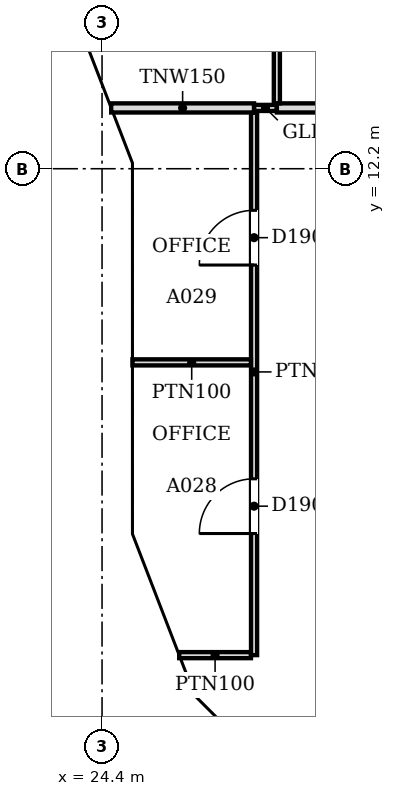
"""IFC4 building model, lengths in metres.
Left out: names, types, materials, properties, quantities, classifications, styles, units other than length and angle.
Written with IfcOpenShell. Run it as: python <this file> out.ifc"""

import sys

from ifc_helpers import new_model, si_unit, direction, frame, frame_2d, origin, place, context, subcontext, project, spatial, polyline, rectangle, outline, extrude, faceted_brep, source, transform, mapped, element, fill, save


model = new_model("IFC4")
c1 = context("Model", 3, precision=1e-05, world=origin(), true_north=direction((0.0, 1.0)))
c2 = subcontext(c1, "Body", "Model", "MODEL_VIEW")
j1 = project(units=[si_unit("LENGTHUNIT", "METRE"), si_unit("PLANEANGLEUNIT", "RADIAN")], contexts=[c1])
p1 = place(None, origin())
s1 = spatial("IfcSite", under=j1, at=p1, CompositionType="ELEMENT")
p2 = place(p1, origin())
s2 = spatial("IfcBuilding", under=s1, at=p2, CompositionType="ELEMENT")
p3 = place(p2, frame((0.0, 0.0, 116.4)))
s3 = spatial("IfcBuildingStorey", under=s2, at=p3, CompositionType="ELEMENT", Elevation=116.4)
m1 = source(origin(), c2, "Body", "Brep", [
    faceted_brep([(3.103, -0.25, 7.544), (0.053, -0.25, 3.864), (0.053, -0.25, 3.736), (3.103, -0.25, 0.056), (0.0, 0.25, 3.8), (3.149, 0.25, 7.6), (3.196, 0.25, 7.543), (3.196, 0.25, 0.057), (3.149, 0.25, 0.0), (3.149, -0.0, 0.0), (3.149, -0.0, 7.6), (0.0, 0.0, 3.8)], [[[0, 1, 2, 3]], [[4, 5, 6, 7, 8]], [[8, 7, 9]], [[6, 5, 10]], [[5, 4, 11, 1, 0, 10]], [[4, 8, 9, 3, 2, 11]], [[11, 2, 1]], [[3, 9, 7, 6, 10, 0]]]),
])
p4 = place(p3, frame((23.517, 15.185, -3.8), z_axis=(0.0, 0.0, 1.0), x_axis=(0.359864468756, -0.933004589553, 0.0)))
e1 = element("IfcWall", 1, at=p4, inside=s3, PredefinedType="SOLIDWALL", context=c2, shape_type="MappedRepresentation", body=[
    mapped(m1, transform((0.0, 0.0, 0.0), scale=1.0)),
])
m2 = source(origin(), c2, "Body", "SweptSolid", [
    extrude(outline(polyline([(2.949, 6.967), (0.325, 3.8), (2.949, 0.633), (2.949, 6.967)])), frame((0.0, 0.26, 0.0), z_axis=(0.0, -1.0, 0.0), x_axis=(1.0, 0.0, 0.0)), (0.0, 0.0, 1.0), 0.52),
])
p5 = place(p4, origin())
e2 = element("IfcOpeningElement", 2, at=p5, cuts=e1, PredefinedType="OPENING", context=c2, shape_type="MappedRepresentation", body=[
    mapped(m2, transform((0.0, 0.0, 0.0), scale=1.0)),
])
m3 = source(origin(), c2, "Body", "Brep", [
    faceted_brep([(0.093, -0.25, 0.057), (3.143, -0.25, 3.8), (0.093, -0.25, 7.543), (0.0, 0.25, 7.544), (0.047, 0.25, 7.6), (3.143, 0.25, 3.8), (0.047, 0.25, 0.0), (0.0, 0.25, 0.056), (0.047, 0.0, 0.0), (0.047, 0.0, 7.6)], [[[0, 1, 2]], [[3, 4, 5, 6, 7]], [[6, 5, 1, 0, 8]], [[5, 4, 9, 2, 1]], [[4, 3, 9]], [[7, 6, 8]], [[7, 8, 0, 2, 9, 3]]]),
])
p6 = place(p3, frame((24.65, 12.293, -3.8), z_axis=(0.0, 0.0, 1.0), x_axis=(0.0, -1.0, 0.0)))
e3 = element("IfcWall", 3, at=p6, inside=s3, PredefinedType="SOLIDWALL", context=c2, shape_type="MappedRepresentation", body=[
    mapped(m3, transform((0.0, 0.0, 0.0), scale=1.0)),
])
m4 = source(origin(), c2, "Body", "SweptSolid", [
    extrude(outline(polyline([(0.247, 0.641), (2.821, 3.8), (0.247, 6.959), (0.247, 0.641)])), frame((0.0, 0.26, 0.0), z_axis=(0.0, -1.0, 0.0), x_axis=(1.0, 0.0, 0.0)), (0.0, 0.0, 1.0), 0.52),
])
p7 = place(p6, origin())
e4 = element("IfcOpeningElement", 4, at=p7, cuts=e3, PredefinedType="OPENING", context=c2, shape_type="MappedRepresentation", body=[
    mapped(m4, transform((0.0, 0.0, 0.0), scale=1.0)),
])
m5 = source(origin(), c2, "Body", "Brep", [
    faceted_brep([(3.003, -0.25, 0.0), (3.05, -0.25, 0.06), (3.05, -0.25, 7.54), (3.003, -0.25, 7.6), (0.0, -0.25, 3.8), (0.0, 0.25, 3.8), (2.957, 0.25, 7.541), (2.957, 0.25, 0.059), (3.003, 0.0, 0.0), (3.003, 0.0, 7.6)], [[[0, 1, 2, 3, 4]], [[5, 6, 7]], [[1, 0, 8]], [[9, 3, 2]], [[6, 5, 4, 3, 9]], [[5, 7, 8, 0, 4]], [[1, 8, 7, 6, 9, 2]]]),
])
p8 = place(p3, frame((24.65, 9.15, -3.8), z_axis=(0.0, 0.0, 1.0), x_axis=(0.0, -1.0, 0.0)))
e5 = element("IfcWall", 5, at=p8, inside=s3, PredefinedType="SOLIDWALL", context=c2, shape_type="MappedRepresentation", body=[
    mapped(m5, transform((0.0, 0.0, 0.0), scale=1.0)),
])
m6 = source(origin(), c2, "Body", "SweptSolid", [
    extrude(outline(polyline([(2.803, 6.944), (0.319, 3.8), (2.803, 0.656), (2.803, 6.944)])), frame((0.0, 0.26, 0.0), z_axis=(0.0, -1.0, 0.0), x_axis=(1.0, 0.0, 0.0)), (0.0, 0.0, 1.0), 0.52),
])
p9 = place(p8, origin())
e6 = element("IfcOpeningElement", 6, at=p9, cuts=e5, PredefinedType="OPENING", context=c2, shape_type="MappedRepresentation", body=[
    mapped(m6, transform((0.0, 0.0, 0.0), scale=1.0)),
])
m7 = source(origin(), c2, "Body", "Brep", [
    faceted_brep([(0.047, -0.25, 0.0), (2.997, -0.25, 3.8), (0.047, -0.25, 7.6), (0.0, -0.25, 7.541), (0.0, -0.25, 0.059), (0.093, 0.25, 7.54), (2.944, 0.25, 3.868), (2.944, 0.25, 3.732), (0.093, 0.25, 0.06), (2.997, 0.0, 3.8), (0.047, 0.0, 0.0), (0.047, 0.0, 7.6)], [[[0, 1, 2, 3, 4]], [[5, 6, 7, 8]], [[8, 7, 9, 1, 0, 10]], [[6, 5, 11, 2, 1, 9]], [[3, 2, 11]], [[10, 0, 4]], [[8, 10, 4, 3, 11, 5]], [[9, 7, 6]]]),
])
p10 = place(p3, frame((24.633, 6.19, -3.8), z_axis=(0.0, 0.0, 1.0), x_axis=(0.359901446078, -0.932990326376, 0.0)))
e7 = element("IfcWall", 7, at=p10, inside=s3, PredefinedType="SOLIDWALL", context=c2, shape_type="MappedRepresentation", body=[
    mapped(m7, transform((0.0, 0.0, 0.0), scale=1.0)),
])
m8 = source(origin(), c2, "Body", "SweptSolid", [
    extrude(outline(polyline([(0.247, 0.665), (2.681, 3.8), (0.247, 6.935), (0.247, 0.665)])), frame((0.0, 0.26, 0.0), z_axis=(0.0, -1.0, 0.0), x_axis=(1.0, 0.0, 0.0)), (0.0, 0.0, 1.0), 0.52),
])
p11 = place(p10, origin())
e8 = element("IfcOpeningElement", 8, at=p11, cuts=e7, PredefinedType="OPENING", context=c2, shape_type="MappedRepresentation", body=[
    mapped(m8, transform((0.0, 0.0, 0.0), scale=1.0)),
])
m9 = source(origin(), c2, "Body", "Brep", [
    faceted_brep([(2.944, -0.25, 0.0), (2.997, -0.25, 0.068), (2.997, -0.25, 7.532), (2.944, -0.25, 7.6), (0.0, -0.25, 3.8), (0.053, 0.25, 3.868), (2.891, 0.25, 7.532), (2.891, 0.25, 0.068), (0.053, 0.25, 3.731), (2.944, 0.0, 0.0), (2.944, 0.0, 7.6), (0.0, 0.0, 3.8)], [[[0, 1, 2, 3, 4]], [[5, 6, 7, 8]], [[1, 0, 9]], [[10, 3, 2]], [[6, 5, 11, 4, 3, 10]], [[8, 7, 9, 0, 4, 11]], [[8, 11, 5]], [[1, 9, 7, 6, 10, 2]]]),
])
p12 = place(p3, frame((25.712, 3.394, -3.8), z_axis=(0.0, 0.0, 1.0), x_axis=(0.707066050402, -0.707147509625, 0.0)))
e9 = element("IfcWall", 9, at=p12, inside=s3, PredefinedType="SOLIDWALL", context=c2, shape_type="MappedRepresentation", body=[
    mapped(m9, transform((0.0, 0.0, 0.0), scale=1.0)),
])
m10 = source(origin(), c2, "Body", "SweptSolid", [
    extrude(outline(polyline([(2.744, 6.934), (0.316, 3.8), (2.744, 0.666), (2.744, 6.934)])), frame((0.0, 0.26, 0.0), z_axis=(0.0, -1.0, 0.0), x_axis=(1.0, 0.0, 0.0)), (0.0, 0.0, 1.0), 0.52),
])
p13 = place(p12, origin())
e10 = element("IfcOpeningElement", 10, at=p13, cuts=e9, PredefinedType="OPENING", context=c2, shape_type="MappedRepresentation", body=[
    mapped(m10, transform((0.0, 0.0, 0.0), scale=1.0)),
])
p14 = place(p2, frame((0.0, 0.0, 120.2)))
s4 = spatial("IfcBuildingStorey", under=s2, at=p14, CompositionType="ELEMENT", Elevation=120.2)
m11 = source(origin(), c2, "Body", "Brep", [
    faceted_brep([(0.106, -0.25, 0.064), (3.156, -0.25, 3.744), (3.156, -0.25, 3.856), (0.106, -0.25, 7.536), (0.0, 0.25, 7.536), (0.053, 0.25, 7.6), (3.202, 0.25, 3.8), (0.053, 0.25, 0.0), (0.0, 0.25, 0.064), (3.202, -0.0, 3.8), (0.053, 0.0, 0.0), (0.053, 0.0, 7.6)], [[[0, 1, 2, 3]], [[4, 5, 6, 7, 8]], [[7, 6, 9, 1, 0, 10]], [[6, 5, 11, 3, 2, 9]], [[5, 4, 11]], [[8, 7, 10]], [[8, 10, 0, 3, 11, 4]], [[1, 9, 2]]]),
])
p15 = place(p14, frame((23.497, 15.234, -3.8), z_axis=(0.0, 0.0, 1.0), x_axis=(0.359913782069, -0.932985567668, 0.0)))
e11 = element("IfcWall", 11, at=p15, inside=s4, PredefinedType="SOLIDWALL", context=c2, shape_type="MappedRepresentation", body=[
    mapped(m11, transform((0.0, 0.0, 0.0), scale=1.0)),
])
m12 = source(origin(), c2, "Body", "SweptSolid", [
    extrude(outline(polyline([(0.253, 0.633), (2.878, 3.8), (0.253, 6.967), (0.253, 0.633)])), frame((0.0, 0.26, 0.0), z_axis=(0.0, -1.0, 0.0), x_axis=(1.0, 0.0, 0.0)), (0.0, 0.0, 1.0), 0.52),
])
p16 = place(p15, origin())
e12 = element("IfcOpeningElement", 12, at=p16, cuts=e11, PredefinedType="OPENING", context=c2, shape_type="MappedRepresentation", body=[
    mapped(m12, transform((0.0, 0.0, 0.0), scale=1.0)),
])
m13 = source(origin(), c2, "Body", "Brep", [
    faceted_brep([(3.096, -0.25, 0.0), (6.1, -0.25, 3.8), (3.096, -0.25, 7.6), (0.047, -0.25, 3.857), (0.047, -0.25, 3.743), (0.0, 0.25, 3.8), (3.096, 0.25, 7.6), (6.053, 0.25, 3.859), (6.053, 0.25, 3.741), (3.096, 0.25, 0.0), (6.1, -0.0, 3.8), (0.0, 0.0, 3.8)], [[[0, 1, 2, 3, 4]], [[5, 6, 7, 8, 9]], [[9, 8, 10, 1, 0]], [[7, 6, 2, 1, 10]], [[6, 5, 11, 3, 2]], [[5, 9, 0, 4, 11]], [[11, 4, 3]], [[10, 8, 7]]]),
])
p17 = place(p14, frame((24.65, 12.247, -3.8), z_axis=(0.0, 0.0, 1.0), x_axis=(0.0, -1.0, 0.0)))
e13 = element("IfcWall", 13, at=p17, inside=s4, PredefinedType="SOLIDWALL", context=c2, shape_type="MappedRepresentation", body=[
    mapped(m13, transform((0.0, 0.0, 0.0), scale=1.0)),
])
m14 = source(origin(), c2, "Body", "SweptSolid", [
    extrude(outline(polyline([(3.094, 0.399), (5.781, 3.8), (3.094, 7.201), (0.323, 3.8), (3.094, 0.399)])), frame((0.0, 0.26, 0.0), z_axis=(0.0, -1.0, 0.0), x_axis=(1.0, 0.0, 0.0)), (0.0, 0.0, 1.0), 0.52),
])
p18 = place(p17, origin())
e14 = element("IfcOpeningElement", 14, at=p18, cuts=e13, PredefinedType="OPENING", context=c2, shape_type="MappedRepresentation", body=[
    mapped(m14, transform((0.0, 0.0, 0.0), scale=1.0)),
])
m15 = source(origin(), c2, "Body", "Brep", [
    faceted_brep([(2.95, -0.25, 0.0), (3.003, -0.25, 0.068), (3.003, -0.25, 7.532), (2.95, -0.25, 7.6), (0.0, -0.25, 3.8), (0.047, 0.25, 3.86), (2.898, 0.25, 7.532), (2.898, 0.25, 0.068), (0.047, 0.25, 3.74), (2.95, 0.0, 0.0), (2.95, 0.0, 7.6), (0.0, 0.0, 3.8)], [[[0, 1, 2, 3, 4]], [[5, 6, 7, 8]], [[1, 0, 9]], [[10, 3, 2]], [[6, 5, 11, 4, 3, 10]], [[8, 7, 9, 0, 4, 11]], [[8, 11, 5]], [[1, 9, 7, 6, 10, 2]]]),
])
p19 = place(p14, frame((24.65, 6.146, -3.8), z_axis=(0.0, 0.0, 1.0), x_axis=(0.359953949349, -0.932970071518, 0.0)))
e15 = element("IfcWall", 15, at=p19, inside=s4, PredefinedType="SOLIDWALL", context=c2, shape_type="MappedRepresentation", body=[
    mapped(m15, transform((0.0, 0.0, 0.0), scale=1.0)),
])
m16 = source(origin(), c2, "Body", "SweptSolid", [
    extrude(outline(polyline([(2.75, 6.935), (0.316, 3.8), (2.75, 0.665), (2.75, 6.935)])), frame((0.0, 0.26, 0.0), z_axis=(0.0, -1.0, 0.0), x_axis=(1.0, 0.0, 0.0)), (0.0, 0.0, 1.0), 0.52),
])
p20 = place(p19, origin())
e16 = element("IfcOpeningElement", 16, at=p20, cuts=e15, PredefinedType="OPENING", context=c2, shape_type="MappedRepresentation", body=[
    mapped(m16, transform((0.0, 0.0, 0.0), scale=1.0)),
])
m17 = source(origin(), c2, "Body", "Brep", [
    faceted_brep([(0.053, -0.25, 0.0), (2.997, -0.25, 3.8), (0.053, -0.25, 7.6), (0.0, -0.25, 7.532), (0.0, -0.25, 0.068), (0.106, 0.25, 7.532), (2.944, 0.25, 3.868), (2.944, 0.25, 3.732), (0.106, 0.25, 0.068), (2.997, 0.0, 3.8), (0.053, 0.0, 0.0), (0.053, 0.0, 7.6)], [[[0, 1, 2, 3, 4]], [[5, 6, 7, 8]], [[8, 7, 9, 1, 0, 10]], [[6, 5, 11, 2, 1, 9]], [[3, 2, 11]], [[10, 0, 4]], [[8, 10, 4, 3, 11, 5]], [[9, 7, 6]]]),
])
p21 = place(p14, frame((25.675, 3.431, -3.8), z_axis=(0.0, 0.0, 1.0), x_axis=(0.707106781187, -0.707106781187, 0.0)))
e17 = element("IfcWall", 17, at=p21, inside=s4, PredefinedType="SOLIDWALL", context=c2, shape_type="MappedRepresentation", body=[
    mapped(m17, transform((0.0, 0.0, 0.0), scale=1.0)),
])
m18 = source(origin(), c2, "Body", "SweptSolid", [
    extrude(outline(polyline([(0.253, 0.667), (2.681, 3.8), (0.253, 6.934), (0.253, 0.667)])), frame((0.0, 0.26, 0.0), z_axis=(0.0, -1.0, 0.0), x_axis=(1.0, 0.0, 0.0)), (0.0, 0.0, 1.0), 0.52),
])
p22 = place(p21, origin())
e18 = element("IfcOpeningElement", 18, at=p22, cuts=e17, PredefinedType="OPENING", context=c2, shape_type="MappedRepresentation", body=[
    mapped(m18, transform((0.0, 0.0, 0.0), scale=1.0)),
])
p23 = place(p3, frame((25.669, 4.2, 0.0), z_axis=(0.0, 0.0, 1.0), x_axis=(1.0, 0.0, 0.0)))
e19 = element("IfcWall", 19, at=p23, inside=s3, PredefinedType="PARTITIONING", context=c2, shape_type="SweptSolid", body=[
    extrude(rectangle(XDim=1.18, YDim=0.1, at=frame_2d((0.59, 0.0))), origin(), (0.0, 0.0, 1.0), 3.067),
])
p24 = place(p3, frame((26.9, 4.2, 0.0), z_axis=(0.0, 0.0, 1.0), x_axis=(0.0, 1.0, 0.0)))
e20 = element("IfcWall", 20, at=p24, inside=s3, PredefinedType="PARTITIONING", context=c2, shape_type="SweptSolid", body=[
    extrude(rectangle(XDim=8.924, YDim=0.1, at=frame_2d((4.462, 0.0))), origin(), (0.0, 0.0, 1.0), 3.067),
])
m19 = source(origin(), c2, "Body", "SweptSolid", [
    extrude(rectangle(XDim=0.9, YDim=2.1, at=frame_2d((0.45, 1.05))), frame((0.0, 0.06, 0.0), z_axis=(0.0, -1.0, 0.0), x_axis=(1.0, 0.0, 0.0)), (0.0, 0.0, 1.0), 0.12),
])
p25 = place(p24, frame((6.416, 0.0, 0.0)))
e21 = element("IfcOpeningElement", 21, at=p25, cuts=e20, PredefinedType="OPENING", context=c2, shape_type="MappedRepresentation", body=[
    mapped(m19, transform((0.0, 0.0, 0.0), scale=1.0)),
])
p26 = place(p24, frame((2.0, 0.0, 0.0)))
e22 = element("IfcOpeningElement", 22, at=p26, cuts=e20, PredefinedType="OPENING", context=c2, shape_type="MappedRepresentation", body=[
    mapped(m19, transform((0.0, 0.0, 0.0), scale=1.0)),
])
p27 = place(p3, frame((24.9, 9.015, 0.0), z_axis=(0.0, 0.0, 1.0), x_axis=(1.0, 0.0, 0.0)))
e23 = element("IfcWall", 23, at=p27, inside=s3, PredefinedType="PARTITIONING", context=c2, shape_type="SweptSolid", body=[
    extrude(rectangle(XDim=1.949, YDim=0.1, at=frame_2d((0.975, 0.0))), origin(), (0.0, 0.0, 1.0), 3.067),
])
p28 = place(p3, frame((24.55, 13.2, 0.0), z_axis=(0.0, 0.0, 1.0), x_axis=(1.0, 0.0, 0.0)))
e24 = element("IfcWall", 24, at=p28, inside=s3, PredefinedType="PARTITIONING", context=c2, shape_type="SweptSolid", body=[
    extrude(rectangle(XDim=2.35, YDim=0.15, at=frame_2d((1.175, 0.0))), origin(), (0.0, 0.0, 1.0), 3.067),
])
p29 = place(p3, frame((26.901, 13.2, 0.0), z_axis=(0.0, 0.0, 1.0), x_axis=(1.0, 0.0, 0.0)))
e25 = element("IfcWall", 25, at=p29, inside=s3, PredefinedType="PARTITIONING", context=c2, shape_type="SweptSolid", body=[
    extrude(rectangle(XDim=0.373, YDim=0.1, at=frame_2d((0.187, 0.0))), origin(), (0.0, 0.0, 1.0), 3.067),
])
p30 = place(p3, frame((27.275, 13.2, 0.0), z_axis=(0.0, 0.0, 1.0), x_axis=(1.0, 0.0, 0.0)))
e26 = element("IfcWall", 26, at=p30, inside=s3, PredefinedType="PARTITIONING", context=c2, shape_type="SweptSolid", body=[
    extrude(rectangle(XDim=16.649, YDim=0.15, at=frame_2d((8.325, 0.0))), origin(), (0.0, 0.0, 1.0), 3.067),
])
p31 = place(p3, frame((27.275, 13.276, 0.0), z_axis=(0.0, 0.0, 1.0), x_axis=(0.0, 1.0, 0.0)))
e27 = element("IfcWall", 27, at=p31, inside=s3, PredefinedType="PARTITIONING", context=c2, shape_type="SweptSolid", body=[
    extrude(rectangle(XDim=5.448, YDim=0.1, at=frame_2d((2.724, 0.0))), origin(), (0.0, 0.0, 1.0), 3.067),
])
p32 = place(p31, frame((2.3, 0.0, 0.0)))
e28 = element("IfcOpeningElement", 28, at=p32, cuts=e27, PredefinedType="OPENING", context=c2, shape_type="MappedRepresentation", body=[
    mapped(m19, transform((0.0, 0.0, 0.0), scale=1.0)),
])
m20 = source(origin(), c2, "Body", "SweptSolid", [
    extrude(rectangle(XDim=0.9, YDim=2.1, at=frame_2d((0.45, 1.05))), frame((0.0, 0.025, 0.0), z_axis=(0.0, -1.0, 0.0), x_axis=(1.0, 0.0, 0.0)), (0.0, 0.0, 1.0), 0.05),
])
p33 = place(p25, origin())
e29 = element("IfcDoor", 29, at=p33, inside=s3, OperationType="SINGLE_SWING_LEFT", PredefinedType="DOOR", context=c2, shape_type="MappedRepresentation", body=[
    mapped(m20, transform((0.0, 0.0, 0.0), scale=1.0)),
])
fill(e21, e29)
p34 = place(p26, origin())
e30 = element("IfcDoor", 30, at=p34, inside=s3, OperationType="SINGLE_SWING_LEFT", PredefinedType="DOOR", context=c2, shape_type="MappedRepresentation", body=[
    mapped(m20, transform((0.0, 0.0, 0.0), scale=1.0)),
])
fill(e22, e30)
save(model, sys.argv[1])
